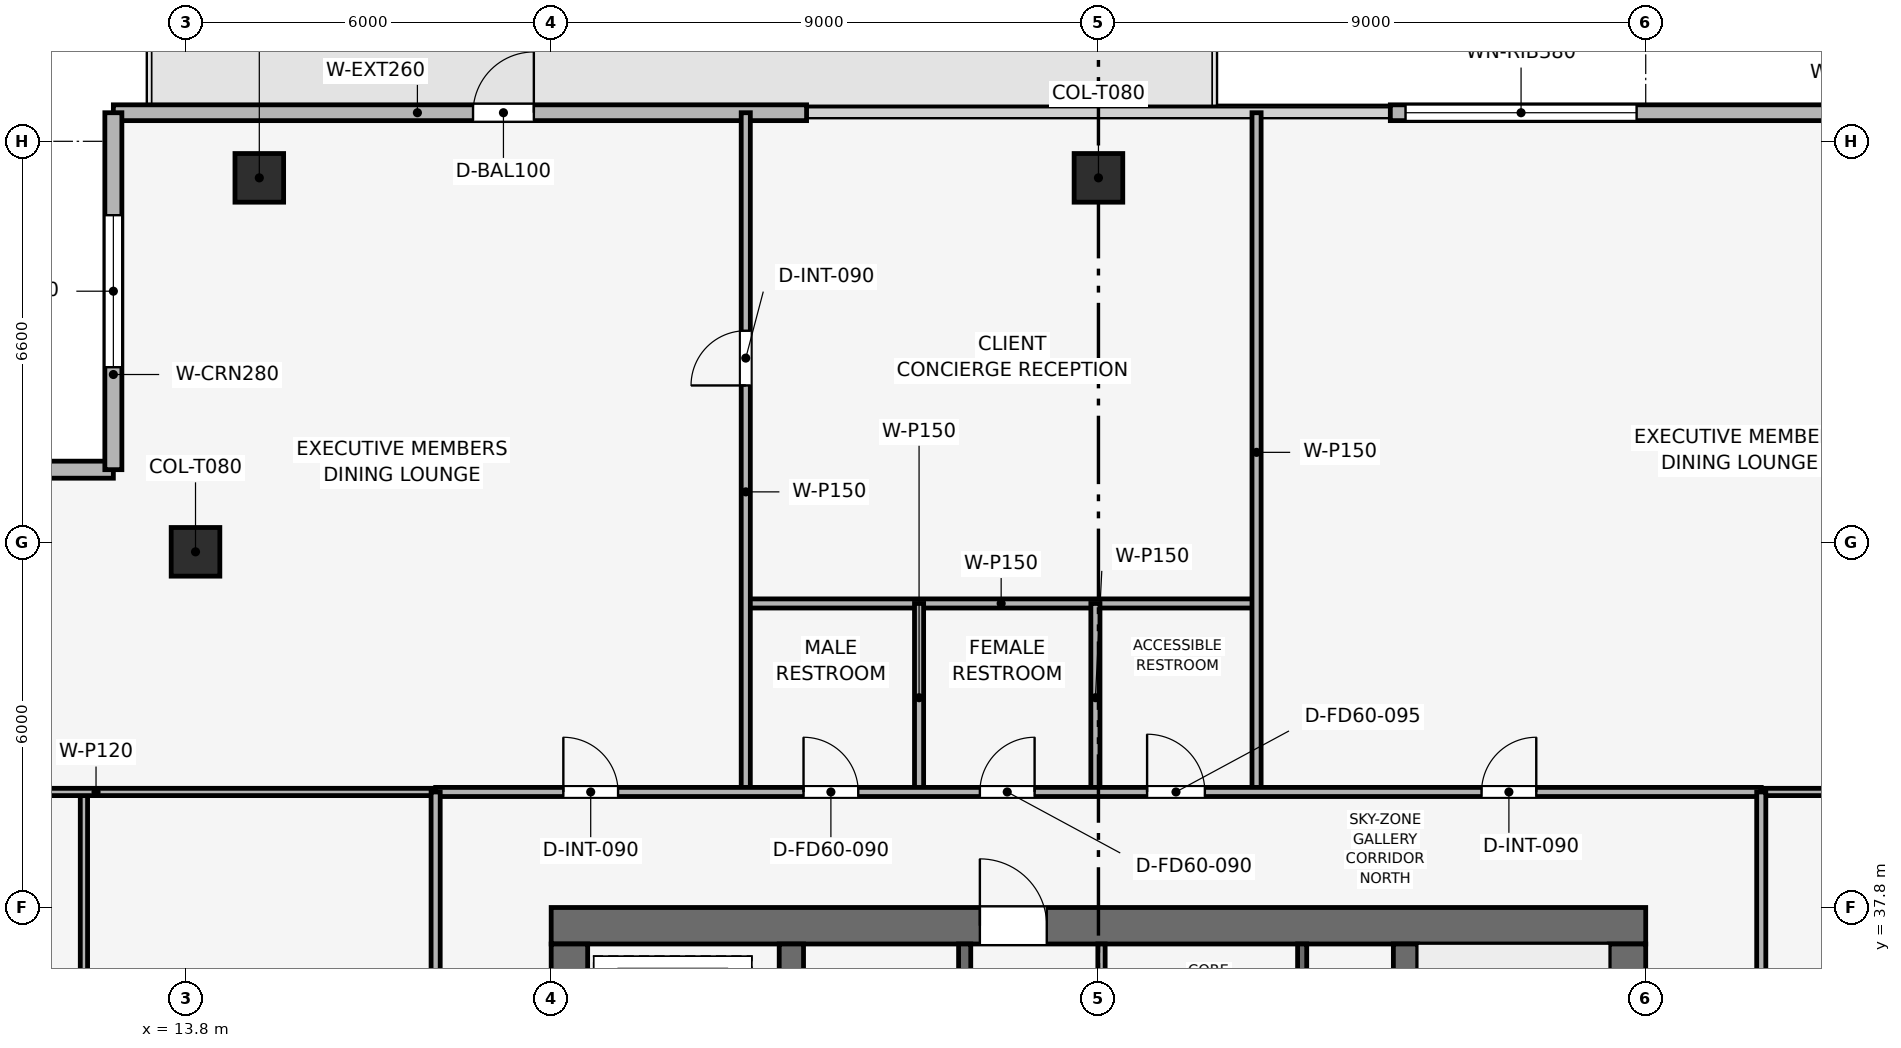
"""IFC4 building model, lengths in metres.
Left out: names, types, materials, properties, quantities, classifications, styles, units other than length and angle.
Written with IfcOpenShell. Run it as: python <this file> out.ifc"""

import sys

from ifc_helpers import new_model, si_unit, direction, frame, frame_2d, origin, origin_2d, place, context, subcontext, project, spatial, rectangle, extrude, element, fill, save


model = new_model("IFC4")
c1 = context("Model", 3, precision=1e-05, world=origin(), true_north=direction((0.0, 1.0)))
c2 = subcontext(c1, "Body", "Model", "MODEL_VIEW")
j1 = project(units=[si_unit("LENGTHUNIT", "METRE"), si_unit("PLANEANGLEUNIT", "RADIAN")], contexts=[c1])
p1 = place(None, origin())
s1 = spatial("IfcSite", under=j1, at=p1, CompositionType="ELEMENT")
p2 = place(p1, origin())
s2 = spatial("IfcBuilding", under=s1, at=p2, CompositionType="ELEMENT")
p3 = place(p2, frame((0.0, 0.0, 340.5)))
s3 = spatial("IfcBuildingStorey", under=s2, at=p3, CompositionType="ELEMENT", Elevation=340.5)
p4 = place(p3, frame((19.8, 37.5, 0.0), z_axis=(0.0, 0.0, 1.0), x_axis=(1.0, 0.0, 0.0)))
e1 = element("IfcWall", 1, at=p4, inside=s3, PredefinedType="SHEAR", context=c2, shape_type="SweptSolid", body=[
    extrude(rectangle(XDim=18.0, YDim=0.6, at=frame_2d((9.0, 0.0))), origin(), (0.0, 0.0, 1.0), 3.75),
])
p5 = place(p4, frame((7.05, 0.0, 0.0)))
e2 = element("IfcOpeningElement", 2, at=p5, cuts=e1, PredefinedType="OPENING", context=c2, shape_type="SweptSolid", body=[
    extrude(rectangle(XDim=1.1, YDim=2.15, at=frame_2d((0.55, 1.075))), frame((0.0, 0.31, 0.0), z_axis=(0.0, -1.0, 0.0), x_axis=(1.0, 0.0, 0.0)), (0.0, 0.0, 1.0), 0.62),
])
p6 = place(p3, frame((20.1, 20.4, 0.0), z_axis=(0.0, 0.0, 1.0), x_axis=(0.0, 1.0, 0.0)))
e3 = element("IfcWall", 3, at=p6, inside=s3, PredefinedType="SHEAR", context=c2, shape_type="SweptSolid", body=[
    extrude(rectangle(XDim=16.8, YDim=0.6, at=frame_2d((8.4, 0.0))), origin(), (0.0, 0.0, 1.0), 3.75),
])
p7 = place(p6, frame((10.4, 0.0, 0.0)))
e4 = element("IfcOpeningElement", 4, at=p7, cuts=e3, PredefinedType="OPENING", context=c2, shape_type="SweptSolid", body=[
    extrude(rectangle(XDim=1.1, YDim=2.15, at=frame_2d((0.55, 1.075))), frame((0.0, 0.31, 0.0), z_axis=(0.0, -1.0, 0.0), x_axis=(1.0, 0.0, 0.0)), (0.0, 0.0, 1.0), 0.62),
])
p8 = place(p3, frame((37.5, 20.4, 0.0), z_axis=(0.0, 0.0, 1.0), x_axis=(0.0, 1.0, 0.0)))
e5 = element("IfcWall", 5, at=p8, inside=s3, PredefinedType="SHEAR", context=c2, shape_type="SweptSolid", body=[
    extrude(rectangle(XDim=16.8, YDim=0.6, at=frame_2d((8.4, 0.0))), origin(), (0.0, 0.0, 1.0), 3.75),
])
p9 = place(p8, frame((4.9, 0.0, 0.0)))
e6 = element("IfcOpeningElement", 6, at=p9, cuts=e5, PredefinedType="OPENING", context=c2, shape_type="SweptSolid", body=[
    extrude(rectangle(XDim=1.1, YDim=2.15, at=frame_2d((0.55, 1.075))), frame((0.0, 0.31, 0.0), z_axis=(0.0, -1.0, 0.0), x_axis=(1.0, 0.0, 0.0)), (0.0, 0.0, 1.0), 0.62),
])
for number, where, z_axis, x_axis in (
    (7, (23.75, 20.4, 0.0), (0.0, 0.0, 1.0), (0.0, 1.0, 0.0)),
    (8, (33.85, 20.4, 0.0), (0.0, 0.0, 1.0), (0.0, 1.0, 0.0)),
):
    element("IfcWall", number, at=place(p3, frame(where, z_axis=z_axis, x_axis=x_axis)), inside=s3, PredefinedType="SHEAR", context=c2, shape_type="SweptSolid", body=[
        extrude(rectangle(XDim=16.8, YDim=0.4, at=frame_2d((8.4, 0.0))), origin(), (0.0, 0.0, 1.0), 3.75),
    ])
p10 = place(p3, frame((28.8, 49.799, 0.003), z_axis=(0.0, -0.23339088867, 0.972382997119), x_axis=(1.0, 0.0, 0.0)))
e9 = element("IfcColumn", 9, at=p10, inside=s3, PredefinedType="COLUMN", context=c2, shape_type="SweptSolid", body=[
    extrude(rectangle(XDim=0.8, YDim=0.8, at=origin_2d()), origin(), (0.0, 0.0, 1.0), 3.604),
])
p11 = place(p3, frame((15.0, 49.799, 0.003), z_axis=(0.026074003672, -0.233311539355, 0.972052401847), x_axis=(0.993813171993, 0.111064752168, 0.0)))
e10 = element("IfcColumn", 10, at=p11, inside=s3, PredefinedType="COLUMN", context=c2, shape_type="SweptSolid", body=[
    extrude(rectangle(XDim=0.8, YDim=0.8, at=origin_2d()), origin(), (0.0, 0.0, 1.0), 3.605),
])
p12 = place(p3, frame((13.951, 43.649, 0.003), z_axis=(0.180471637502, -0.180404272202, 0.966894144479), x_axis=(0.706974772083, 0.70723876565, 0.0)))
e11 = element("IfcColumn", 11, at=p12, inside=s3, PredefinedType="COLUMN", context=c2, shape_type="SweptSolid", body=[
    extrude(rectangle(XDim=0.8, YDim=0.8, at=origin_2d()), origin(), (0.0, 0.0, 1.0), 3.624),
])
p13 = place(p3, frame((12.6, 50.87, 0.0), z_axis=(0.0, 0.0, 1.0), x_axis=(1.0, 0.0, 0.0)))
e12 = element("IfcWall", 12, at=p13, inside=s3, PredefinedType="SOLIDWALL", context=c2, shape_type="SweptSolid", body=[
    extrude(rectangle(XDim=11.4, YDim=0.26, at=frame_2d((5.7, 0.0))), origin(), (0.0, 0.0, 1.0), 3.51),
])
p14 = place(p13, frame((5.915, 0.0, 0.0)))
e13 = element("IfcOpeningElement", 13, at=p14, cuts=e12, PredefinedType="OPENING", context=c2, shape_type="SweptSolid", body=[
    extrude(rectangle(XDim=1.0, YDim=2.2, at=frame_2d((0.5, 1.1))), frame((0.0, 0.14, 0.0), z_axis=(0.0, -1.0, 0.0), x_axis=(1.0, 0.0, 0.0)), (0.0, 0.0, 1.0), 0.28),
])
p15 = place(p3, frame((33.6, 50.87, 0.0), z_axis=(0.0, 0.0, 1.0), x_axis=(1.0, 0.0, 0.0)))
e14 = element("IfcWall", 14, at=p15, inside=s3, PredefinedType="SOLIDWALL", context=c2, shape_type="SweptSolid", body=[
    extrude(rectangle(XDim=11.4, YDim=0.26, at=frame_2d((5.7, 0.0))), origin(), (0.0, 0.0, 1.0), 3.51),
])
p16 = place(p15, frame((0.25, 0.0, 0.9)))
e15 = element("IfcOpeningElement", 15, at=p16, cuts=e14, PredefinedType="OPENING", context=c2, shape_type="SweptSolid", body=[
    extrude(rectangle(XDim=3.8, YDim=1.9, at=frame_2d((1.9, 0.95))), frame((0.0, 0.14, 0.0), z_axis=(0.0, -1.0, 0.0), x_axis=(1.0, 0.0, 0.0)), (0.0, 0.0, 1.0), 0.28),
])
p17 = place(p3, frame((6.73, 45.0, 0.0), z_axis=(0.0, 0.0, 1.0), x_axis=(1.0, 0.0, 0.0)))
e16 = element("IfcWall", 16, at=p17, inside=s3, PredefinedType="SOLIDWALL", context=c2, shape_type="SweptSolid", body=[
    extrude(rectangle(XDim=5.87, YDim=0.28, at=frame_2d((2.935, 0.0))), origin(), (0.0, 0.0, 1.0), 3.51),
])
p18 = place(p17, frame((1.685, 0.0, 0.9)))
e17 = element("IfcOpeningElement", 17, at=p18, cuts=e16, PredefinedType="OPENING", context=c2, shape_type="SweptSolid", body=[
    extrude(rectangle(XDim=2.5, YDim=1.9, at=frame_2d((1.25, 0.95))), frame((0.0, 0.15, 0.0), z_axis=(0.0, -1.0, 0.0), x_axis=(1.0, 0.0, 0.0)), (0.0, 0.0, 1.0), 0.3),
])
p19 = place(p3, frame((12.6, 45.0, 0.0), z_axis=(0.0, 0.0, 1.0), x_axis=(0.0, 1.0, 0.0)))
e18 = element("IfcWall", 18, at=p19, inside=s3, PredefinedType="SOLIDWALL", context=c2, shape_type="SweptSolid", body=[
    extrude(rectangle(XDim=5.87, YDim=0.28, at=frame_2d((2.935, 0.0))), origin(), (0.0, 0.0, 1.0), 3.51),
])
p20 = place(p19, frame((1.685, 0.0, 0.9)))
e19 = element("IfcOpeningElement", 19, at=p20, cuts=e18, PredefinedType="OPENING", context=c2, shape_type="SweptSolid", body=[
    extrude(rectangle(XDim=2.5, YDim=1.9, at=frame_2d((1.25, 0.95))), frame((0.0, 0.15, 0.0), z_axis=(0.0, -1.0, 0.0), x_axis=(1.0, 0.0, 0.0)), (0.0, 0.0, 1.0), 0.3),
])
p21 = place(p3, frame((32.15, 34.0, 0.0), z_axis=(0.0, 0.0, 1.0), x_axis=(0.0, 1.0, 0.0)))
e20 = element("IfcWall", 20, at=p21, inside=s3, PredefinedType="SHEAR", context=c2, shape_type="SweptSolid", body=[
    extrude(rectangle(XDim=3.2, YDim=0.15, at=frame_2d((1.6, 0.0))), origin(), (0.0, 0.0, 1.0), 3.51),
])
p22 = place(p3, frame((26.6, 34.0, 0.0), z_axis=(0.0, 0.0, 1.0), x_axis=(0.0, 1.0, 0.0)))
e21 = element("IfcWall", 21, at=p22, inside=s3, PredefinedType="SHEAR", context=c2, shape_type="SweptSolid", body=[
    extrude(rectangle(XDim=3.2, YDim=0.2, at=frame_2d((1.6, 0.0))), origin(), (0.0, 0.0, 1.0), 3.51),
])
p23 = place(p22, frame((0.75, 0.0, 0.0)))
e22 = element("IfcOpeningElement", 22, at=p23, cuts=e21, PredefinedType="OPENING", context=c2, shape_type="SweptSolid", body=[
    extrude(rectangle(XDim=1.1, YDim=2.15, at=frame_2d((0.55, 1.075))), frame((0.0, 0.11, 0.0), z_axis=(0.0, -1.0, 0.0), x_axis=(1.0, 0.0, 0.0)), (0.0, 0.0, 1.0), 0.22),
])
p24 = place(p3, frame((28.85, 33.925, 0.0), z_axis=(0.0, 0.0, 1.0), x_axis=(0.0, 1.0, 0.0)))
e23 = element("IfcWall", 23, at=p24, inside=s3, PredefinedType="PARTITIONING", context=c2, shape_type="SweptSolid", body=[
    extrude(rectangle(XDim=3.275, YDim=0.12, at=frame_2d((1.637, 0.0))), origin(), (0.0, 0.0, 1.0), 3.51),
])
p25 = place(p24, frame((0.25, 0.0, 0.0)))
e24 = element("IfcOpeningElement", 24, at=p25, cuts=e23, PredefinedType="OPENING", context=c2, shape_type="SweptSolid", body=[
    extrude(rectangle(XDim=0.85, YDim=2.1, at=frame_2d((0.425, 1.05))), frame((0.0, 0.07, 0.0), z_axis=(0.0, -1.0, 0.0), x_axis=(1.0, 0.0, 0.0)), (0.0, 0.0, 1.0), 0.14),
])
p26 = place(p24, frame((1.795, 0.0, 0.0)))
e25 = element("IfcOpeningElement", 25, at=p26, cuts=e23, PredefinedType="OPENING", context=c2, shape_type="SweptSolid", body=[
    extrude(rectangle(XDim=0.85, YDim=2.1, at=frame_2d((0.425, 1.05))), frame((0.0, 0.07, 0.0), z_axis=(0.0, -1.0, 0.0), x_axis=(1.0, 0.0, 0.0)), (0.0, 0.0, 1.0), 0.14),
])
p27 = place(p3, frame((23.0, 42.8, 0.0), z_axis=(0.0, 0.0, 1.0), x_axis=(1.0, 0.0, 0.0)))
e26 = element("IfcWall", 26, at=p27, inside=s3, PredefinedType="PARTITIONING", context=c2, shape_type="SweptSolid", body=[
    extrude(rectangle(XDim=8.4, YDim=0.15, at=frame_2d((4.2, 0.0))), origin(), (0.0, 0.0, 1.0), 3.095),
])
p28 = place(p3, frame((23.0, 39.7, 0.0), z_axis=(0.0, 0.0, 1.0), x_axis=(0.0, 1.0, 0.0)))
e27 = element("IfcWall", 27, at=p28, inside=s3, PredefinedType="PARTITIONING", context=c2, shape_type="SweptSolid", body=[
    extrude(rectangle(XDim=11.17, YDim=0.15, at=frame_2d((5.585, 0.0))), origin(), (0.0, 0.0, 1.0), 3.135),
])
p29 = place(p28, frame((6.685, 0.0, 0.0)))
e28 = element("IfcOpeningElement", 28, at=p29, cuts=e27, PredefinedType="OPENING", context=c2, shape_type="SweptSolid", body=[
    extrude(rectangle(XDim=0.9, YDim=2.1, at=frame_2d((0.45, 1.05))), frame((0.0, 0.085, 0.0), z_axis=(0.0, -1.0, 0.0), x_axis=(1.0, 0.0, 0.0)), (0.0, 0.0, 1.0), 0.17),
])
p30 = place(p3, frame((31.4, 39.7, 0.0), z_axis=(0.0, 0.0, 1.0), x_axis=(0.0, 1.0, 0.0)))
e29 = element("IfcWall", 29, at=p30, inside=s3, PredefinedType="PARTITIONING", context=c2, shape_type="SweptSolid", body=[
    extrude(rectangle(XDim=11.17, YDim=0.15, at=frame_2d((5.585, 0.0))), origin(), (0.0, 0.0, 1.0), 3.135),
])
p31 = place(p3, frame((25.85, 39.7, 0.0), z_axis=(0.0, 0.0, 1.0), x_axis=(0.0, 1.0, 0.0)))
e30 = element("IfcWall", 30, at=p31, inside=s3, PredefinedType="PARTITIONING", context=c2, shape_type="SweptSolid", body=[
    extrude(rectangle(XDim=3.1, YDim=0.15, at=frame_2d((1.55, 0.0))), origin(), (0.0, 0.0, 1.0), 3.135),
])
p32 = place(p3, frame((28.75, 39.7, 0.0), z_axis=(0.0, 0.0, 1.0), x_axis=(0.0, 1.0, 0.0)))
e31 = element("IfcWall", 31, at=p32, inside=s3, PredefinedType="PARTITIONING", context=c2, shape_type="SweptSolid", body=[
    extrude(rectangle(XDim=3.1, YDim=0.15, at=frame_2d((1.55, 0.0))), origin(), (0.0, 0.0, 1.0), 3.095),
])
p33 = place(p3, frame((12.116, 21.875, 0.0), z_axis=(0.0, 0.0, 1.0), x_axis=(0.0, 1.0, 0.0)))
e32 = element("IfcWall", 32, at=p33, inside=s3, PredefinedType="PARTITIONING", context=c2, shape_type="SweptSolid", body=[
    extrude(rectangle(XDim=17.825, YDim=0.12, at=frame_2d((8.913, 0.0))), origin(), (0.0, 0.0, 1.0), 3.095),
])
p34 = place(p33, frame((13.282, 0.0, 0.0)))
e33 = element("IfcOpeningElement", 33, at=p34, cuts=e32, PredefinedType="OPENING", context=c2, shape_type="SweptSolid", body=[
    extrude(rectangle(XDim=0.9, YDim=2.1, at=frame_2d((0.45, 1.05))), frame((0.0, 0.07, 0.0), z_axis=(0.0, -1.0, 0.0), x_axis=(1.0, 0.0, 0.0)), (0.0, 0.0, 1.0), 0.14),
])
p35 = place(p3, frame((6.73, 39.7, 0.0), z_axis=(0.0, 0.0, 1.0), x_axis=(1.0, 0.0, 0.0)))
e34 = element("IfcWall", 34, at=p35, inside=s3, PredefinedType="PARTITIONING", context=c2, shape_type="SweptSolid", body=[
    extrude(rectangle(XDim=11.17, YDim=0.12, at=frame_2d((5.585, 0.0))), origin(), (0.0, 0.0, 1.0), 3.095),
])
p36 = place(p3, frame((39.7, 39.7, 0.0), z_axis=(0.0, 0.0, 1.0), x_axis=(1.0, 0.0, 0.0)))
e35 = element("IfcWall", 35, at=p36, inside=s3, PredefinedType="PARTITIONING", context=c2, shape_type="SweptSolid", body=[
    extrude(rectangle(XDim=11.17, YDim=0.12, at=frame_2d((5.585, 0.0))), origin(), (0.0, 0.0, 1.0), 3.095),
])
p37 = place(p3, frame((17.9, 39.7, 0.0), z_axis=(0.0, 0.0, 1.0), x_axis=(1.0, 0.0, 0.0)))
e36 = element("IfcWall", 36, at=p37, inside=s3, PredefinedType="PARTITIONING", context=c2, shape_type="SweptSolid", body=[
    extrude(rectangle(XDim=21.8, YDim=0.15, at=frame_2d((10.9, 0.0))), origin(), (0.0, 0.0, 1.0), 3.095),
])
p38 = place(p37, frame((2.1, 0.0, 0.0)))
e37 = element("IfcOpeningElement", 37, at=p38, cuts=e36, PredefinedType="OPENING", context=c2, shape_type="SweptSolid", body=[
    extrude(rectangle(XDim=0.9, YDim=2.1, at=frame_2d((0.45, 1.05))), frame((0.0, 0.085, 0.0), z_axis=(0.0, -1.0, 0.0), x_axis=(1.0, 0.0, 0.0)), (0.0, 0.0, 1.0), 0.17),
])
p39 = place(p37, frame((6.05, 0.0, 0.0)))
e38 = element("IfcOpeningElement", 38, at=p39, cuts=e36, PredefinedType="OPENING", context=c2, shape_type="SweptSolid", body=[
    extrude(rectangle(XDim=0.9, YDim=2.1, at=frame_2d((0.45, 1.05))), frame((0.0, 0.085, 0.0), z_axis=(0.0, -1.0, 0.0), x_axis=(1.0, 0.0, 0.0)), (0.0, 0.0, 1.0), 0.17),
])
p40 = place(p37, frame((8.95, 0.0, 0.0)))
e39 = element("IfcOpeningElement", 39, at=p40, cuts=e36, PredefinedType="OPENING", context=c2, shape_type="SweptSolid", body=[
    extrude(rectangle(XDim=0.9, YDim=2.1, at=frame_2d((0.45, 1.05))), frame((0.0, 0.085, 0.0), z_axis=(0.0, -1.0, 0.0), x_axis=(1.0, 0.0, 0.0)), (0.0, 0.0, 1.0), 0.17),
])
p41 = place(p37, frame((11.7, 0.0, 0.0)))
e40 = element("IfcOpeningElement", 40, at=p41, cuts=e36, PredefinedType="OPENING", context=c2, shape_type="SweptSolid", body=[
    extrude(rectangle(XDim=0.95, YDim=2.1, at=frame_2d((0.475, 1.05))), frame((0.0, 0.085, 0.0), z_axis=(0.0, -1.0, 0.0), x_axis=(1.0, 0.0, 0.0)), (0.0, 0.0, 1.0), 0.17),
])
p42 = place(p37, frame((17.2, 0.0, 0.0)))
e41 = element("IfcOpeningElement", 41, at=p42, cuts=e36, PredefinedType="OPENING", context=c2, shape_type="SweptSolid", body=[
    extrude(rectangle(XDim=0.9, YDim=2.1, at=frame_2d((0.45, 1.05))), frame((0.0, 0.085, 0.0), z_axis=(0.0, -1.0, 0.0), x_axis=(1.0, 0.0, 0.0)), (0.0, 0.0, 1.0), 0.17),
])
p43 = place(p3, frame((17.9, 12.6, 0.0), z_axis=(0.0, 0.0, 1.0), x_axis=(0.0, 1.0, 0.0)))
e42 = element("IfcWall", 42, at=p43, inside=s3, PredefinedType="PARTITIONING", context=c2, shape_type="SweptSolid", body=[
    extrude(rectangle(XDim=27.1, YDim=0.15, at=frame_2d((13.55, 0.0))), origin(), (0.0, 0.0, 1.0), 3.095),
])
p44 = place(p43, frame((4.188, 0.0, 0.0)))
e43 = element("IfcOpeningElement", 43, at=p44, cuts=e42, PredefinedType="OPENING", context=c2, shape_type="SweptSolid", body=[
    extrude(rectangle(XDim=0.9, YDim=2.1, at=frame_2d((0.45, 1.05))), frame((0.0, 0.085, 0.0), z_axis=(0.0, -1.0, 0.0), x_axis=(1.0, 0.0, 0.0)), (0.0, 0.0, 1.0), 0.17),
])
p45 = place(p43, frame((17.738, 0.0, 0.0)))
e44 = element("IfcOpeningElement", 44, at=p45, cuts=e42, PredefinedType="OPENING", context=c2, shape_type="SweptSolid", body=[
    extrude(rectangle(XDim=0.9, YDim=2.1, at=frame_2d((0.45, 1.05))), frame((0.0, 0.085, 0.0), z_axis=(0.0, -1.0, 0.0), x_axis=(1.0, 0.0, 0.0)), (0.0, 0.0, 1.0), 0.17),
])
p46 = place(p3, frame((39.7, 24.4, 0.0), z_axis=(0.0, 0.0, 1.0), x_axis=(0.0, 1.0, 0.0)))
e45 = element("IfcWall", 45, at=p46, inside=s3, PredefinedType="PARTITIONING", context=c2, shape_type="SweptSolid", body=[
    extrude(rectangle(XDim=15.3, YDim=0.15, at=frame_2d((7.65, 0.0))), origin(), (0.0, 0.0, 1.0), 3.095),
])
p47 = place(p46, frame((7.2, 0.0, 0.0)))
e46 = element("IfcOpeningElement", 46, at=p47, cuts=e45, PredefinedType="OPENING", context=c2, shape_type="SweptSolid", body=[
    extrude(rectangle(XDim=0.9, YDim=2.1, at=frame_2d((0.45, 1.05))), frame((0.0, 0.085, 0.0), z_axis=(0.0, -1.0, 0.0), x_axis=(1.0, 0.0, 0.0)), (0.0, 0.0, 1.0), 0.17),
])
p48 = place(p14, origin())
e47 = element("IfcDoor", 47, at=p48, inside=s3, OperationType="SINGLE_SWING_RIGHT", PredefinedType="DOOR", context=c2, shape_type="SweptSolid", body=[
    extrude(rectangle(XDim=1.0, YDim=2.2, at=frame_2d((0.5, 1.1))), frame((0.0, 0.025, 0.0), z_axis=(0.0, -1.0, 0.0), x_axis=(1.0, 0.0, 0.0)), (0.0, 0.0, 1.0), 0.05),
])
fill(e13, e47)
p49 = place(p16, origin())
e48 = element("IfcWindow", 48, at=p49, inside=s3, PartitioningType="SINGLE_PANEL", PredefinedType="WINDOW", context=c2, shape_type="SweptSolid", body=[
    extrude(rectangle(XDim=3.8, YDim=1.9, at=frame_2d((1.9, 0.95))), frame((0.0, 0.03, 0.0), z_axis=(0.0, -1.0, 0.0), x_axis=(1.0, 0.0, 0.0)), (0.0, 0.0, 1.0), 0.06),
])
fill(e15, e48)
p50 = place(p20, origin())
e49 = element("IfcWindow", 49, at=p50, inside=s3, PartitioningType="SINGLE_PANEL", PredefinedType="WINDOW", context=c2, shape_type="SweptSolid", body=[
    extrude(rectangle(XDim=2.5, YDim=1.9, at=frame_2d((1.25, 0.95))), frame((0.0, 0.03, 0.0), z_axis=(0.0, -1.0, 0.0), x_axis=(1.0, 0.0, 0.0)), (0.0, 0.0, 1.0), 0.06),
])
fill(e19, e49)
p51 = place(p29, origin())
e50 = element("IfcDoor", 50, at=p51, inside=s3, OperationType="SINGLE_SWING_LEFT", PredefinedType="DOOR", context=c2, shape_type="SweptSolid", body=[
    extrude(rectangle(XDim=0.9, YDim=2.1, at=frame_2d((0.45, 1.05))), frame((0.0, 0.025, 0.0), z_axis=(0.0, -1.0, 0.0), x_axis=(1.0, 0.0, 0.0)), (0.0, 0.0, 1.0), 0.05),
])
fill(e28, e50)
p52 = place(p38, origin())
e51 = element("IfcDoor", 51, at=p52, inside=s3, OperationType="SINGLE_SWING_LEFT", PredefinedType="DOOR", context=c2, shape_type="SweptSolid", body=[
    extrude(rectangle(XDim=0.9, YDim=2.1, at=frame_2d((0.45, 1.05))), frame((0.0, 0.025, 0.0), z_axis=(0.0, -1.0, 0.0), x_axis=(1.0, 0.0, 0.0)), (0.0, 0.0, 1.0), 0.05),
])
fill(e37, e51)
p53 = place(p39, origin())
e52 = element("IfcDoor", 52, at=p53, inside=s3, OperationType="SINGLE_SWING_LEFT", PredefinedType="DOOR", context=c2, shape_type="SweptSolid", body=[
    extrude(rectangle(XDim=0.9, YDim=2.1, at=frame_2d((0.45, 1.05))), frame((0.0, 0.025, 0.0), z_axis=(0.0, -1.0, 0.0), x_axis=(1.0, 0.0, 0.0)), (0.0, 0.0, 1.0), 0.05),
])
fill(e38, e52)
p54 = place(p40, origin())
e53 = element("IfcDoor", 53, at=p54, inside=s3, OperationType="SINGLE_SWING_RIGHT", PredefinedType="DOOR", context=c2, shape_type="SweptSolid", body=[
    extrude(rectangle(XDim=0.9, YDim=2.1, at=frame_2d((0.45, 1.05))), frame((0.0, 0.025, 0.0), z_axis=(0.0, -1.0, 0.0), x_axis=(1.0, 0.0, 0.0)), (0.0, 0.0, 1.0), 0.05),
])
fill(e39, e53)
p55 = place(p41, origin())
e54 = element("IfcDoor", 54, at=p55, inside=s3, OperationType="SINGLE_SWING_LEFT", PredefinedType="DOOR", context=c2, shape_type="SweptSolid", body=[
    extrude(rectangle(XDim=0.95, YDim=2.1, at=frame_2d((0.475, 1.05))), frame((0.0, 0.025, 0.0), z_axis=(0.0, -1.0, 0.0), x_axis=(1.0, 0.0, 0.0)), (0.0, 0.0, 1.0), 0.05),
])
fill(e40, e54)
p56 = place(p42, origin())
e55 = element("IfcDoor", 55, at=p56, inside=s3, OperationType="SINGLE_SWING_RIGHT", PredefinedType="DOOR", context=c2, shape_type="SweptSolid", body=[
    extrude(rectangle(XDim=0.9, YDim=2.1, at=frame_2d((0.45, 1.05))), frame((0.0, 0.025, 0.0), z_axis=(0.0, -1.0, 0.0), x_axis=(1.0, 0.0, 0.0)), (0.0, 0.0, 1.0), 0.05),
])
fill(e41, e55)
p57 = place(p5, origin())
e56 = element("IfcDoor", 56, at=p57, inside=s3, OperationType="SINGLE_SWING_LEFT", PredefinedType="DOOR", context=c2, shape_type="SweptSolid", body=[
    extrude(rectangle(XDim=1.1, YDim=2.15, at=frame_2d((0.55, 1.075))), frame((0.0, 0.025, 0.0), z_axis=(0.0, -1.0, 0.0), x_axis=(1.0, 0.0, 0.0)), (0.0, 0.0, 1.0), 0.05),
])
fill(e2, e56)
save(model, sys.argv[1])
